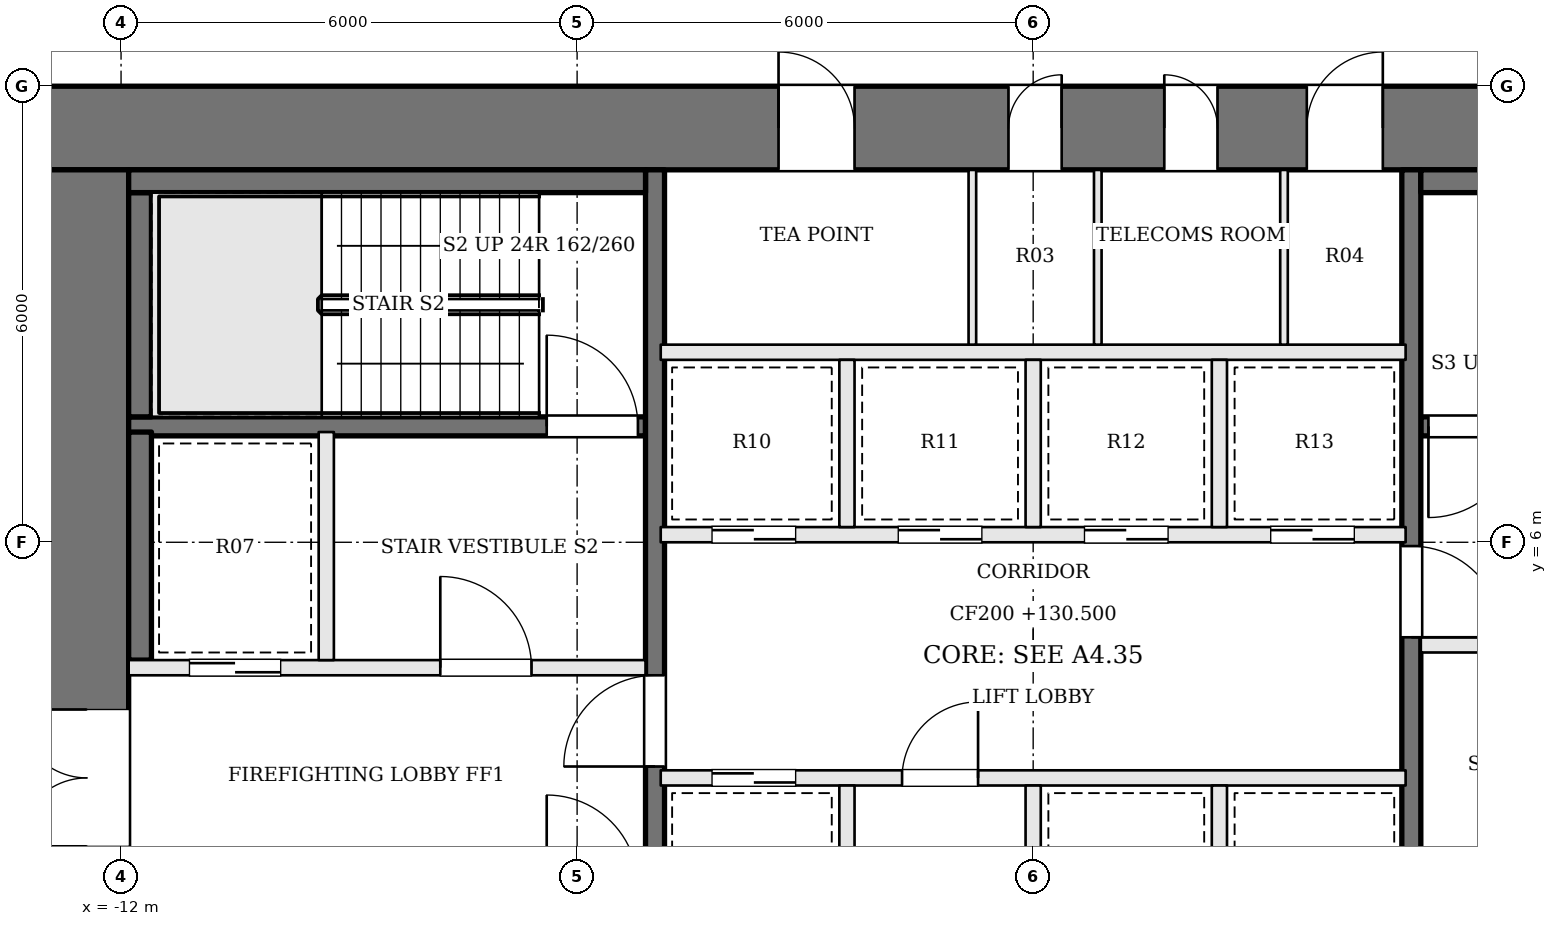
"""IFC4 building model, lengths in metres.
Left out: names, types, materials, properties, quantities, classifications, styles, units other than length and angle.
Written with IfcOpenShell. Run it as: python <this file> out.ifc"""

import sys

from ifc_helpers import new_model, si_unit, direction, frame, frame_2d, origin, place, context, subcontext, project, spatial, rectangle, extrude, element, fill, save


model = new_model("IFC4")
c1 = context("Model", 3, precision=1e-05, world=origin(), true_north=direction((0.0, 1.0)))
c2 = subcontext(c1, "Body", "Model", "MODEL_VIEW")
j1 = project(units=[si_unit("LENGTHUNIT", "METRE"), si_unit("PLANEANGLEUNIT", "RADIAN")], contexts=[c1])
p1 = place(None, origin())
s1 = spatial("IfcSite", under=j1, at=p1, CompositionType="ELEMENT")
p2 = place(p1, origin())
s2 = spatial("IfcBuilding", under=s1, at=p2, CompositionType="ELEMENT")
p3 = place(p2, frame((0.0, 0.0, 130.5)))
s3 = spatial("IfcBuildingStorey", under=s2, at=p3, CompositionType="ELEMENT", Elevation=130.5)
p4 = place(p3, frame((-13.0, 11.45, 0.0), z_axis=(0.0, 0.0, 1.0), x_axis=(1.0, 0.0, 0.0)))
e1 = element("IfcWall", 1, at=p4, inside=s3, PredefinedType="SHEAR", context=c2, shape_type="SweptSolid", body=[
    extrude(rectangle(XDim=26.0, YDim=1.1, at=frame_2d((13.0, 0.0))), origin(), (0.0, 0.0, 1.0), 3.9),
])
p5 = place(p4, frame((9.65, 0.0, 0.0)))
e2 = element("IfcOpeningElement", 2, at=p5, cuts=e1, PredefinedType="OPENING", context=c2, shape_type="SweptSolid", body=[
    extrude(rectangle(XDim=1.0, YDim=2.1, at=frame_2d((0.5, 1.05))), frame((0.0, 0.56, 0.0), z_axis=(0.0, -1.0, 0.0), x_axis=(1.0, 0.0, 0.0)), (0.0, 0.0, 1.0), 1.12),
])
p6 = place(p4, frame((12.675, 0.0, 0.0)))
e3 = element("IfcOpeningElement", 3, at=p6, cuts=e1, PredefinedType="OPENING", context=c2, shape_type="SweptSolid", body=[
    extrude(rectangle(XDim=0.7, YDim=2.1, at=frame_2d((0.35, 1.05))), frame((0.0, 0.56, 0.0), z_axis=(0.0, -1.0, 0.0), x_axis=(1.0, 0.0, 0.0)), (0.0, 0.0, 1.0), 1.12),
])
p7 = place(p4, frame((14.725, 0.0, 0.0)))
e4 = element("IfcOpeningElement", 4, at=p7, cuts=e1, PredefinedType="OPENING", context=c2, shape_type="SweptSolid", body=[
    extrude(rectangle(XDim=0.7, YDim=2.1, at=frame_2d((0.35, 1.05))), frame((0.0, 0.56, 0.0), z_axis=(0.0, -1.0, 0.0), x_axis=(1.0, 0.0, 0.0)), (0.0, 0.0, 1.0), 1.12),
])
p8 = place(p4, frame((16.6, 0.0, 0.0)))
e5 = element("IfcOpeningElement", 5, at=p8, cuts=e1, PredefinedType="OPENING", context=c2, shape_type="SweptSolid", body=[
    extrude(rectangle(XDim=1.0, YDim=2.1, at=frame_2d((0.5, 1.05))), frame((0.0, 0.56, 0.0), z_axis=(0.0, -1.0, 0.0), x_axis=(1.0, 0.0, 0.0)), (0.0, 0.0, 1.0), 1.12),
])
p9 = place(p3, frame((-12.45, -1.9, 0.0), z_axis=(0.0, 0.0, 1.0), x_axis=(0.0, 1.0, 0.0)))
e6 = element("IfcWall", 6, at=p9, inside=s3, PredefinedType="SHEAR", context=c2, shape_type="SweptSolid", body=[
    extrude(rectangle(XDim=12.8, YDim=1.1, at=frame_2d((6.4, 0.0))), origin(), (0.0, 0.0, 1.0), 3.9),
])
p10 = place(p9, frame((3.9, 0.0, 0.0)))
e7 = element("IfcOpeningElement", 7, at=p10, cuts=e6, PredefinedType="OPENING", context=c2, shape_type="SweptSolid", body=[
    extrude(rectangle(XDim=1.8, YDim=2.1, at=frame_2d((0.9, 1.05))), frame((0.0, 0.56, 0.0), z_axis=(0.0, -1.0, 0.0), x_axis=(1.0, 0.0, 0.0)), (0.0, 0.0, 1.0), 1.12),
])
p11 = place(p3, frame((11.9, 7.525, 0.0), z_axis=(0.0, 0.0, 1.0), x_axis=(-1.0, 0.0, 0.0)))
e8 = element("IfcWall", 8, at=p11, inside=s3, PredefinedType="SOLIDWALL", context=c2, shape_type="SweptSolid", body=[
    extrude(rectangle(XDim=6.8, YDim=0.25, at=frame_2d((3.4, 0.0))), origin(), (0.0, 0.0, 1.0), 3.7),
])
p12 = place(p11, frame((5.5, 0.0, 0.0)))
e9 = element("IfcOpeningElement", 9, at=p12, cuts=e8, PredefinedType="OPENING", context=c2, shape_type="SweptSolid", body=[
    extrude(rectangle(XDim=1.2, YDim=2.1, at=frame_2d((0.6, 1.05))), frame((0.0, 0.135, 0.0), z_axis=(0.0, -1.0, 0.0), x_axis=(1.0, 0.0, 0.0)), (0.0, 0.0, 1.0), 0.27),
])
p13 = place(p3, frame((-11.9, 4.35, 0.0), z_axis=(0.0, 0.0, 1.0), x_axis=(1.0, 0.0, 0.0)))
e10 = element("IfcWall", 10, at=p13, inside=s3, PredefinedType="SOLIDWALL", context=c2, shape_type="SweptSolid", body=[
    extrude(rectangle(XDim=6.8, YDim=0.2, at=frame_2d((3.4, 0.0))), origin(), (0.0, 0.0, 1.0), 3.7),
])
p14 = place(p13, frame((4.1, 0.0, 0.0)))
e11 = element("IfcOpeningElement", 11, at=p14, cuts=e10, PredefinedType="OPENING", context=c2, shape_type="SweptSolid", body=[
    extrude(rectangle(XDim=1.2, YDim=2.1, at=frame_2d((0.6, 1.05))), frame((0.0, 0.11, 0.0), z_axis=(0.0, -1.0, 0.0), x_axis=(1.0, 0.0, 0.0)), (0.0, 0.0, 1.0), 0.22),
])
p15 = place(p13, frame((0.8, 0.0, 0.0)))
e12 = element("IfcOpeningElement", 12, at=p15, cuts=e10, PredefinedType="OPENING", context=c2, shape_type="SweptSolid", body=[
    extrude(rectangle(XDim=1.2, YDim=2.1, at=frame_2d((0.6, 1.05))), frame((0.0, 0.11, 0.0), z_axis=(0.0, -1.0, 0.0), x_axis=(1.0, 0.0, 0.0)), (0.0, 0.0, 1.0), 0.22),
])
p16 = place(p3, frame((11.9, 4.65, 0.0), z_axis=(0.0, 0.0, 1.0), x_axis=(-1.0, 0.0, 0.0)))
e13 = element("IfcWall", 13, at=p16, inside=s3, PredefinedType="SOLIDWALL", context=c2, shape_type="SweptSolid", body=[
    extrude(rectangle(XDim=6.8, YDim=0.2, at=frame_2d((3.4, 0.0))), origin(), (0.0, 0.0, 1.0), 3.7),
])
p17 = place(p16, frame((4.1, 0.0, 0.0)))
e14 = element("IfcOpeningElement", 14, at=p17, cuts=e13, PredefinedType="OPENING", context=c2, shape_type="SweptSolid", body=[
    extrude(rectangle(XDim=1.2, YDim=2.1, at=frame_2d((0.6, 1.05))), frame((0.0, 0.11, 0.0), z_axis=(0.0, -1.0, 0.0), x_axis=(1.0, 0.0, 0.0)), (0.0, 0.0, 1.0), 0.22),
])
p18 = place(p16, frame((0.8, 0.0, 0.0)))
e15 = element("IfcOpeningElement", 15, at=p18, cuts=e13, PredefinedType="OPENING", context=c2, shape_type="SweptSolid", body=[
    extrude(rectangle(XDim=1.2, YDim=2.1, at=frame_2d((0.6, 1.05))), frame((0.0, 0.11, 0.0), z_axis=(0.0, -1.0, 0.0), x_axis=(1.0, 0.0, 0.0)), (0.0, 0.0, 1.0), 0.22),
])
p19 = place(p3, frame((-11.9, 7.525, 0.0), z_axis=(0.0, 0.0, 1.0), x_axis=(1.0, 0.0, 0.0)))
e16 = element("IfcWall", 16, at=p19, inside=s3, PredefinedType="SOLIDWALL", context=c2, shape_type="SweptSolid", body=[
    extrude(rectangle(XDim=6.8, YDim=0.25, at=frame_2d((3.4, 0.0))), origin(), (0.0, 0.0, 1.0), 3.7),
])
p20 = place(p19, frame((5.5, 0.0, 0.0)))
e17 = element("IfcOpeningElement", 17, at=p20, cuts=e16, PredefinedType="OPENING", context=c2, shape_type="SweptSolid", body=[
    extrude(rectangle(XDim=1.2, YDim=2.1, at=frame_2d((0.6, 1.05))), frame((0.0, 0.135, 0.0), z_axis=(0.0, -1.0, 0.0), x_axis=(1.0, 0.0, 0.0)), (0.0, 0.0, 1.0), 0.27),
])
p21 = place(p3, frame((-9.3, 4.45, 0.0), z_axis=(0.0, 0.0, 1.0), x_axis=(0.0, 1.0, 0.0)))
e18 = element("IfcWall", 18, at=p21, inside=s3, PredefinedType="SOLIDWALL", context=c2, shape_type="SweptSolid", body=[
    extrude(rectangle(XDim=3.0, YDim=0.2, at=frame_2d((1.5, 0.0))), origin(), (0.0, 0.0, 1.0), 3.7),
])
p22 = place(p3, frame((-4.975, -1.9, 0.0), z_axis=(0.0, 0.0, 1.0), x_axis=(0.0, 1.0, 0.0)))
e19 = element("IfcWall", 19, at=p22, inside=s3, PredefinedType="SOLIDWALL", context=c2, shape_type="SweptSolid", body=[
    extrude(rectangle(XDim=12.8, YDim=0.25, at=frame_2d((6.4, 0.0))), origin(), (0.0, 0.0, 1.0), 3.7),
])
p23 = place(p22, frame((4.95, 0.0, 0.0)))
e20 = element("IfcOpeningElement", 20, at=p23, cuts=e19, PredefinedType="OPENING", context=c2, shape_type="SweptSolid", body=[
    extrude(rectangle(XDim=1.2, YDim=2.1, at=frame_2d((0.6, 1.05))), frame((0.0, 0.135, 0.0), z_axis=(0.0, -1.0, 0.0), x_axis=(1.0, 0.0, 0.0)), (0.0, 0.0, 1.0), 0.27),
])
p24 = place(p3, frame((4.975, 10.9, 0.0), z_axis=(0.0, 0.0, 1.0), x_axis=(0.0, -1.0, 0.0)))
e21 = element("IfcWall", 21, at=p24, inside=s3, PredefinedType="SOLIDWALL", context=c2, shape_type="SweptSolid", body=[
    extrude(rectangle(XDim=12.8, YDim=0.25, at=frame_2d((6.4, 0.0))), origin(), (0.0, 0.0, 1.0), 3.7),
])
p25 = place(p24, frame((4.95, 0.0, 0.0)))
e22 = element("IfcOpeningElement", 22, at=p25, cuts=e21, PredefinedType="OPENING", context=c2, shape_type="SweptSolid", body=[
    extrude(rectangle(XDim=1.2, YDim=2.1, at=frame_2d((0.6, 1.05))), frame((0.0, 0.135, 0.0), z_axis=(0.0, -1.0, 0.0), x_axis=(1.0, 0.0, 0.0)), (0.0, 0.0, 1.0), 0.27),
])
p26 = place(p3, frame((-11.75, 4.45, 0.0), z_axis=(0.0, 0.0, 1.0), x_axis=(0.0, 1.0, 0.0)))
e23 = element("IfcWall", 23, at=p26, inside=s3, PredefinedType="SOLIDWALL", context=c2, shape_type="SweptSolid", body=[
    extrude(rectangle(XDim=3.0, YDim=0.3, at=frame_2d((1.5, 0.0))), origin(), (0.0, 0.0, 1.0), 3.7),
])
p27 = place(p3, frame((-11.75, 7.65, 0.0), z_axis=(0.0, 0.0, 1.0), x_axis=(0.0, 1.0, 0.0)))
e24 = element("IfcWall", 24, at=p27, inside=s3, PredefinedType="SOLIDWALL", context=c2, shape_type="SweptSolid", body=[
    extrude(rectangle(XDim=2.95, YDim=0.3, at=frame_2d((1.475, 0.0))), origin(), (0.0, 0.0, 1.0), 3.7),
])
for number, where, z_axis, x_axis in (
    (25, (-11.9, 10.75, 0.0), (0.0, 0.0, 1.0), (1.0, 0.0, 0.0)),
    (26, (11.9, 10.75, 0.0), (0.0, 0.0, 1.0), (-1.0, 0.0, 0.0)),
):
    element("IfcWall", number, at=place(p3, frame(where, z_axis=z_axis, x_axis=x_axis)), inside=s3, PredefinedType="SOLIDWALL", context=c2, shape_type="SweptSolid", body=[
        extrude(rectangle(XDim=6.8, YDim=0.3, at=frame_2d((3.4, 0.0))), origin(), (0.0, 0.0, 1.0), 3.7),
    ])
p28 = place(p3, frame((-4.9, 2.9, 0.0), z_axis=(0.0, 0.0, 1.0), x_axis=(1.0, 0.0, 0.0)))
e27 = element("IfcWall", 27, at=p28, inside=s3, PredefinedType="SOLIDWALL", context=c2, shape_type="SweptSolid", body=[
    extrude(rectangle(XDim=9.8, YDim=0.2, at=frame_2d((4.9, 0.0))), origin(), (0.0, 0.0, 1.0), 3.7),
])
p29 = place(p28, frame((0.675, 0.0, 0.0)))
e28 = element("IfcOpeningElement", 28, at=p29, cuts=e27, PredefinedType="OPENING", context=c2, shape_type="SweptSolid", body=[
    extrude(rectangle(XDim=1.1, YDim=2.1, at=frame_2d((0.55, 1.05))), frame((0.0, 0.11, 0.0), z_axis=(0.0, -1.0, 0.0), x_axis=(1.0, 0.0, 0.0)), (0.0, 0.0, 1.0), 0.22),
])
p30 = place(p28, frame((3.175, 0.0, 0.0)))
e29 = element("IfcOpeningElement", 29, at=p30, cuts=e27, PredefinedType="OPENING", context=c2, shape_type="SweptSolid", body=[
    extrude(rectangle(XDim=1.0, YDim=2.1, at=frame_2d((0.5, 1.05))), frame((0.0, 0.11, 0.0), z_axis=(0.0, -1.0, 0.0), x_axis=(1.0, 0.0, 0.0)), (0.0, 0.0, 1.0), 0.22),
])
p31 = place(p3, frame((-4.9, 6.1, 0.0), z_axis=(0.0, 0.0, 1.0), x_axis=(1.0, 0.0, 0.0)))
e30 = element("IfcWall", 30, at=p31, inside=s3, PredefinedType="SOLIDWALL", context=c2, shape_type="SweptSolid", body=[
    extrude(rectangle(XDim=9.8, YDim=0.2, at=frame_2d((4.9, 0.0))), origin(), (0.0, 0.0, 1.0), 3.7),
])
p32 = place(p31, frame((0.675, 0.0, 0.0)))
e31 = element("IfcOpeningElement", 31, at=p32, cuts=e30, PredefinedType="OPENING", context=c2, shape_type="SweptSolid", body=[
    extrude(rectangle(XDim=1.1, YDim=2.1, at=frame_2d((0.55, 1.05))), frame((0.0, 0.11, 0.0), z_axis=(0.0, -1.0, 0.0), x_axis=(1.0, 0.0, 0.0)), (0.0, 0.0, 1.0), 0.22),
])
p33 = place(p31, frame((3.125, 0.0, 0.0)))
e32 = element("IfcOpeningElement", 32, at=p33, cuts=e30, PredefinedType="OPENING", context=c2, shape_type="SweptSolid", body=[
    extrude(rectangle(XDim=1.1, YDim=2.1, at=frame_2d((0.55, 1.05))), frame((0.0, 0.11, 0.0), z_axis=(0.0, -1.0, 0.0), x_axis=(1.0, 0.0, 0.0)), (0.0, 0.0, 1.0), 0.22),
])
p34 = place(p31, frame((5.575, 0.0, 0.0)))
e33 = element("IfcOpeningElement", 33, at=p34, cuts=e30, PredefinedType="OPENING", context=c2, shape_type="SweptSolid", body=[
    extrude(rectangle(XDim=1.1, YDim=2.1, at=frame_2d((0.55, 1.05))), frame((0.0, 0.11, 0.0), z_axis=(0.0, -1.0, 0.0), x_axis=(1.0, 0.0, 0.0)), (0.0, 0.0, 1.0), 0.22),
])
p35 = place(p31, frame((8.025, 0.0, 0.0)))
e34 = element("IfcOpeningElement", 34, at=p35, cuts=e30, PredefinedType="OPENING", context=c2, shape_type="SweptSolid", body=[
    extrude(rectangle(XDim=1.1, YDim=2.1, at=frame_2d((0.55, 1.05))), frame((0.0, 0.11, 0.0), z_axis=(0.0, -1.0, 0.0), x_axis=(1.0, 0.0, 0.0)), (0.0, 0.0, 1.0), 0.22),
])
p36 = place(p3, frame((-4.9, 8.5, 0.0), z_axis=(0.0, 0.0, 1.0), x_axis=(1.0, 0.0, 0.0)))
e35 = element("IfcWall", 35, at=p36, inside=s3, PredefinedType="SOLIDWALL", context=c2, shape_type="SweptSolid", body=[
    extrude(rectangle(XDim=9.8, YDim=0.2, at=frame_2d((4.9, 0.0))), origin(), (0.0, 0.0, 1.0), 3.7),
])
for number, where, z_axis, x_axis in (
    (36, (-2.45, 0.6, 0.0), (0.0, 0.0, 1.0), (0.0, 1.0, 0.0)),
    (37, (0.0, 0.6, 0.0), (0.0, 0.0, 1.0), (0.0, 1.0, 0.0)),
    (38, (2.45, 0.6, 0.0), (0.0, 0.0, 1.0), (0.0, 1.0, 0.0)),
    (39, (-2.45, 6.2, 0.0), (0.0, 0.0, 1.0), (0.0, 1.0, 0.0)),
    (40, (0.0, 6.2, 0.0), (0.0, 0.0, 1.0), (0.0, 1.0, 0.0)),
    (41, (2.45, 6.2, 0.0), (0.0, 0.0, 1.0), (0.0, 1.0, 0.0)),
):
    element("IfcWall", number, at=place(p3, frame(where, z_axis=z_axis, x_axis=x_axis)), inside=s3, PredefinedType="SOLIDWALL", context=c2, shape_type="SweptSolid", body=[
        extrude(rectangle(XDim=2.2, YDim=0.2, at=frame_2d((1.1, 0.0))), origin(), (0.0, 0.0, 1.0), 3.7),
    ])
for number, where, z_axis, x_axis in (
    (42, (-0.8, 8.6, 0.0), (0.0, 0.0, 1.0), (0.0, 1.0, 0.0)),
    (43, (0.85, 8.6, 0.0), (0.0, 0.0, 1.0), (0.0, 1.0, 0.0)),
    (44, (3.3, 8.6, 0.0), (0.0, 0.0, 1.0), (0.0, 1.0, 0.0)),
):
    element("IfcWall", number, at=place(p3, frame(where, z_axis=z_axis, x_axis=x_axis)), inside=s3, PredefinedType="PARTITIONING", context=c2, shape_type="SweptSolid", body=[
        extrude(rectangle(XDim=2.3, YDim=0.1, at=frame_2d((1.15, 0.0))), origin(), (0.0, 0.0, 1.0), 3.7),
    ])
p37 = place(p10, origin())
e45 = element("IfcDoor", 45, at=p37, inside=s3, OperationType="DOUBLE_DOOR_SINGLE_SWING", PredefinedType="DOOR", context=c2, shape_type="SweptSolid", body=[
    extrude(rectangle(XDim=1.8, YDim=2.1, at=frame_2d((0.9, 1.05))), frame((0.0, 0.025, 0.0), z_axis=(0.0, -1.0, 0.0), x_axis=(1.0, 0.0, 0.0)), (0.0, 0.0, 1.0), 0.05),
])
fill(e7, e45)
p38 = place(p23, origin())
e46 = element("IfcDoor", 46, at=p38, inside=s3, OperationType="SINGLE_SWING_LEFT", PredefinedType="DOOR", context=c2, shape_type="SweptSolid", body=[
    extrude(rectangle(XDim=1.2, YDim=2.1, at=frame_2d((0.6, 1.05))), frame((0.0, 0.025, 0.0), z_axis=(0.0, -1.0, 0.0), x_axis=(1.0, 0.0, 0.0)), (0.0, 0.0, 1.0), 0.05),
])
fill(e20, e46)
p39 = place(p25, origin())
e47 = element("IfcDoor", 47, at=p39, inside=s3, OperationType="SINGLE_SWING_RIGHT", PredefinedType="DOOR", context=c2, shape_type="SweptSolid", body=[
    extrude(rectangle(XDim=1.2, YDim=2.1, at=frame_2d((0.6, 1.05))), frame((0.0, 0.025, 0.0), z_axis=(0.0, -1.0, 0.0), x_axis=(1.0, 0.0, 0.0)), (0.0, 0.0, 1.0), 0.05),
])
fill(e22, e47)
p40 = place(p14, origin())
e48 = element("IfcDoor", 48, at=p40, inside=s3, OperationType="SINGLE_SWING_LEFT", PredefinedType="DOOR", context=c2, shape_type="SweptSolid", body=[
    extrude(rectangle(XDim=1.2, YDim=2.1, at=frame_2d((0.6, 1.05))), frame((0.0, 0.025, 0.0), z_axis=(0.0, -1.0, 0.0), x_axis=(1.0, 0.0, 0.0)), (0.0, 0.0, 1.0), 0.05),
])
fill(e11, e48)
p41 = place(p12, origin())
e49 = element("IfcDoor", 49, at=p41, inside=s3, OperationType="SINGLE_SWING_RIGHT", PredefinedType="DOOR", context=c2, shape_type="SweptSolid", body=[
    extrude(rectangle(XDim=1.2, YDim=2.1, at=frame_2d((0.6, 1.05))), frame((0.0, 0.025, 0.0), z_axis=(0.0, -1.0, 0.0), x_axis=(1.0, 0.0, 0.0)), (0.0, 0.0, 1.0), 0.05),
])
fill(e9, e49)
p42 = place(p20, origin())
e50 = element("IfcDoor", 50, at=p42, inside=s3, OperationType="SINGLE_SWING_LEFT", PredefinedType="DOOR", context=c2, shape_type="SweptSolid", body=[
    extrude(rectangle(XDim=1.2, YDim=2.1, at=frame_2d((0.6, 1.05))), frame((0.0, 0.025, 0.0), z_axis=(0.0, -1.0, 0.0), x_axis=(1.0, 0.0, 0.0)), (0.0, 0.0, 1.0), 0.05),
])
fill(e17, e50)
p43 = place(p15, origin())
e51 = element("IfcDoor", 51, at=p43, inside=s3, OperationType="SLIDING_TO_RIGHT", PredefinedType="DOOR", context=c2, shape_type="SweptSolid", body=[
    extrude(rectangle(XDim=1.2, YDim=2.1, at=frame_2d((0.6, 1.05))), frame((0.0, 0.025, 0.0), z_axis=(0.0, -1.0, 0.0), x_axis=(1.0, 0.0, 0.0)), (0.0, 0.0, 1.0), 0.05),
])
fill(e12, e51)
p44 = place(p29, origin())
e52 = element("IfcDoor", 52, at=p44, inside=s3, OperationType="SLIDING_TO_RIGHT", PredefinedType="DOOR", context=c2, shape_type="SweptSolid", body=[
    extrude(rectangle(XDim=1.1, YDim=2.1, at=frame_2d((0.55, 1.05))), frame((0.0, 0.025, 0.0), z_axis=(0.0, -1.0, 0.0), x_axis=(1.0, 0.0, 0.0)), (0.0, 0.0, 1.0), 0.05),
])
fill(e28, e52)
p45 = place(p30, origin())
e53 = element("IfcDoor", 53, at=p45, inside=s3, OperationType="SINGLE_SWING_RIGHT", PredefinedType="DOOR", context=c2, shape_type="SweptSolid", body=[
    extrude(rectangle(XDim=1.0, YDim=2.1, at=frame_2d((0.5, 1.05))), frame((0.0, 0.025, 0.0), z_axis=(0.0, -1.0, 0.0), x_axis=(1.0, 0.0, 0.0)), (0.0, 0.0, 1.0), 0.05),
])
fill(e29, e53)
p46 = place(p32, origin())
e54 = element("IfcDoor", 54, at=p46, inside=s3, OperationType="SLIDING_TO_RIGHT", PredefinedType="DOOR", context=c2, shape_type="SweptSolid", body=[
    extrude(rectangle(XDim=1.1, YDim=2.1, at=frame_2d((0.55, 1.05))), frame((0.0, 0.025, 0.0), z_axis=(0.0, -1.0, 0.0), x_axis=(1.0, 0.0, 0.0)), (0.0, 0.0, 1.0), 0.05),
])
fill(e31, e54)
p47 = place(p33, origin())
e55 = element("IfcDoor", 55, at=p47, inside=s3, OperationType="SLIDING_TO_LEFT", PredefinedType="DOOR", context=c2, shape_type="SweptSolid", body=[
    extrude(rectangle(XDim=1.1, YDim=2.1, at=frame_2d((0.55, 1.05))), frame((0.0, 0.025, 0.0), z_axis=(0.0, -1.0, 0.0), x_axis=(1.0, 0.0, 0.0)), (0.0, 0.0, 1.0), 0.05),
])
fill(e32, e55)
p48 = place(p34, origin())
e56 = element("IfcDoor", 56, at=p48, inside=s3, OperationType="SLIDING_TO_RIGHT", PredefinedType="DOOR", context=c2, shape_type="SweptSolid", body=[
    extrude(rectangle(XDim=1.1, YDim=2.1, at=frame_2d((0.55, 1.05))), frame((0.0, 0.025, 0.0), z_axis=(0.0, -1.0, 0.0), x_axis=(1.0, 0.0, 0.0)), (0.0, 0.0, 1.0), 0.05),
])
fill(e33, e56)
p49 = place(p35, origin())
e57 = element("IfcDoor", 57, at=p49, inside=s3, OperationType="SLIDING_TO_LEFT", PredefinedType="DOOR", context=c2, shape_type="SweptSolid", body=[
    extrude(rectangle(XDim=1.1, YDim=2.1, at=frame_2d((0.55, 1.05))), frame((0.0, 0.025, 0.0), z_axis=(0.0, -1.0, 0.0), x_axis=(1.0, 0.0, 0.0)), (0.0, 0.0, 1.0), 0.05),
])
fill(e34, e57)
p50 = place(p5, origin())
e58 = element("IfcDoor", 58, at=p50, inside=s3, OperationType="SINGLE_SWING_LEFT", PredefinedType="DOOR", context=c2, shape_type="SweptSolid", body=[
    extrude(rectangle(XDim=1.0, YDim=2.1, at=frame_2d((0.5, 1.05))), frame((0.0, 0.025, 0.0), z_axis=(0.0, -1.0, 0.0), x_axis=(1.0, 0.0, 0.0)), (0.0, 0.0, 1.0), 0.05),
])
fill(e2, e58)
p51 = place(p6, origin())
e59 = element("IfcDoor", 59, at=p51, inside=s3, OperationType="SINGLE_SWING_RIGHT", PredefinedType="DOOR", context=c2, shape_type="SweptSolid", body=[
    extrude(rectangle(XDim=0.7, YDim=2.1, at=frame_2d((0.35, 1.05))), frame((0.0, 0.025, 0.0), z_axis=(0.0, -1.0, 0.0), x_axis=(1.0, 0.0, 0.0)), (0.0, 0.0, 1.0), 0.05),
])
fill(e3, e59)
p52 = place(p7, origin())
e60 = element("IfcDoor", 60, at=p52, inside=s3, OperationType="SINGLE_SWING_LEFT", PredefinedType="DOOR", context=c2, shape_type="SweptSolid", body=[
    extrude(rectangle(XDim=0.7, YDim=2.1, at=frame_2d((0.35, 1.05))), frame((0.0, 0.025, 0.0), z_axis=(0.0, -1.0, 0.0), x_axis=(1.0, 0.0, 0.0)), (0.0, 0.0, 1.0), 0.05),
])
fill(e4, e60)
p53 = place(p8, origin())
e61 = element("IfcDoor", 61, at=p53, inside=s3, OperationType="SINGLE_SWING_RIGHT", PredefinedType="DOOR", context=c2, shape_type="SweptSolid", body=[
    extrude(rectangle(XDim=1.0, YDim=2.1, at=frame_2d((0.5, 1.05))), frame((0.0, 0.025, 0.0), z_axis=(0.0, -1.0, 0.0), x_axis=(1.0, 0.0, 0.0)), (0.0, 0.0, 1.0), 0.05),
])
fill(e5, e61)
save(model, sys.argv[1])
